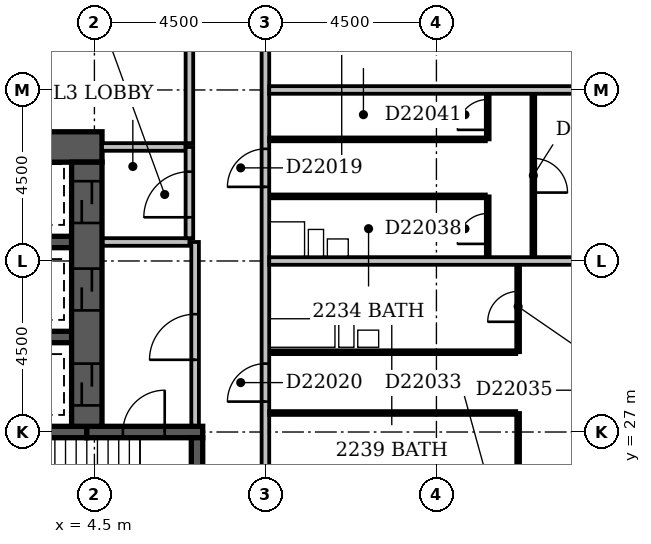
"""IFC4 building model, lengths in metres.
Left out: names, types, materials, properties, quantities, classifications, styles, units other than length and angle.
Written with IfcOpenShell. Run it as: python <this file> out.ifc"""

import sys

from ifc_helpers import new_model, si_unit, direction, frame, frame_2d, origin, place, context, subcontext, project, spatial, rectangle, extrude, element, fill, save


model = new_model("IFC4")
c1 = context("Model", 3, precision=1e-05, world=origin(), true_north=direction((0.0, 1.0)))
c2 = subcontext(c1, "Body", "Model", "MODEL_VIEW")
j1 = project(units=[si_unit("LENGTHUNIT", "METRE"), si_unit("PLANEANGLEUNIT", "RADIAN")], contexts=[c1])
p1 = place(None, origin())
s1 = spatial("IfcSite", under=j1, at=p1, CompositionType="ELEMENT")
p2 = place(p1, origin())
s2 = spatial("IfcBuilding", under=s1, at=p2, CompositionType="ELEMENT")
p3 = place(p2, frame((0.0, 0.0, 90.2)))
s3 = spatial("IfcBuildingStorey", under=s2, at=p3, CompositionType="ELEMENT", Elevation=90.2)
p4 = place(p3, frame((0.1, 34.5, -0.3), z_axis=(0.0, 0.0, 1.0), x_axis=(1.0, 0.0, 0.0)))
e1 = element("IfcWall", 1, at=p4, inside=s3, PredefinedType="SHEAR", context=c2, shape_type="SweptSolid", body=[
    extrude(rectangle(XDim=4.6, YDim=0.8, at=frame_2d((2.3, 0.0))), origin(), (0.0, 0.0, 1.0), 3.6),
])
p5 = place(p3, frame((0.35, 27.0, -0.3), z_axis=(0.0, 0.0, 1.0), x_axis=(1.0, 0.0, 0.0)))
e2 = element("IfcWall", 2, at=p5, inside=s3, PredefinedType="SHEAR", context=c2, shape_type="SweptSolid", body=[
    extrude(rectangle(XDim=3.95, YDim=0.3, at=frame_2d((1.975, 0.0))), origin(), (0.0, 0.0, 1.0), 3.6),
])
for number, where, z_axis, x_axis in (
    (3, (0.9, 29.5, -0.3), (0.0, 0.0, 1.0), (1.0, 0.0, 0.0)),
    (4, (0.9, 32.0, -0.3), (0.0, 0.0, 1.0), (1.0, 0.0, 0.0)),
):
    element("IfcWall", number, at=place(p3, frame(where, z_axis=z_axis, x_axis=x_axis)), inside=s3, PredefinedType="SHEAR", context=c2, shape_type="SweptSolid", body=[
        extrude(rectangle(XDim=3.0, YDim=0.3, at=frame_2d((1.5, 0.0))), origin(), (0.0, 0.0, 1.0), 3.6),
    ])
p6 = place(p3, frame((4.3, 27.0, -0.3), z_axis=(0.0, 0.0, 1.0), x_axis=(1.0, 0.0, 0.0)))
e5 = element("IfcWall", 5, at=p6, inside=s3, PredefinedType="SHEAR", context=c2, shape_type="SweptSolid", body=[
    extrude(rectangle(XDim=3.05, YDim=0.3, at=frame_2d((1.525, 0.0))), origin(), (0.0, 0.0, 1.0), 3.6),
])
p7 = place(p6, frame((0.95, 0.0, 0.3)))
e6 = element("IfcOpeningElement", 6, at=p7, cuts=e5, PredefinedType="OPENING", context=c2, shape_type="SweptSolid", body=[
    extrude(rectangle(XDim=1.1, YDim=2.1, at=frame_2d((0.55, 1.05))), frame((0.0, 0.162, 0.0), z_axis=(0.0, -1.0, 0.0), x_axis=(1.0, 0.0, 0.0)), (0.0, 0.0, 1.0), 0.324),
])
p8 = place(p3, frame((4.3, 27.15, -0.3), z_axis=(0.0, 0.0, 1.0), x_axis=(0.0, 1.0, 0.0)))
e7 = element("IfcWall", 7, at=p8, inside=s3, PredefinedType="SHEAR", context=c2, shape_type="SweptSolid", body=[
    extrude(rectangle(XDim=6.95, YDim=0.8, at=frame_2d((3.475, 0.0))), origin(), (0.0, 0.0, 1.0), 3.6),
])
p9 = place(p8, frame((3.05, 0.0, 0.3)))
e8 = element("IfcOpeningElement", 8, at=p9, cuts=e7, PredefinedType="OPENING", context=c2, shape_type="SweptSolid", body=[
    extrude(rectangle(XDim=1.1, YDim=2.1, at=frame_2d((0.55, 1.05))), frame((0.0, 0.412, 0.0), z_axis=(0.0, -1.0, 0.0), x_axis=(1.0, 0.0, 0.0)), (0.0, 0.0, 1.0), 0.824),
])
p10 = place(p8, frame((0.55, 0.0, 0.3)))
e9 = element("IfcOpeningElement", 9, at=p10, cuts=e7, PredefinedType="OPENING", context=c2, shape_type="SweptSolid", body=[
    extrude(rectangle(XDim=1.1, YDim=2.1, at=frame_2d((0.55, 1.05))), frame((0.0, 0.412, 0.0), z_axis=(0.0, -1.0, 0.0), x_axis=(1.0, 0.0, 0.0)), (0.0, 0.0, 1.0), 0.824),
])
p11 = place(p8, frame((5.35, 0.0, 0.3)))
e10 = element("IfcOpeningElement", 10, at=p11, cuts=e7, PredefinedType="OPENING", context=c2, shape_type="SweptSolid", body=[
    extrude(rectangle(XDim=1.1, YDim=2.1, at=frame_2d((0.55, 1.05))), frame((0.0, 0.412, 0.0), z_axis=(0.0, -1.0, 0.0), x_axis=(1.0, 0.0, 0.0)), (0.0, 0.0, 1.0), 0.824),
])
p12 = place(p3, frame((7.2, 22.65, -0.3), z_axis=(0.0, 0.0, 1.0), x_axis=(0.0, 1.0, 0.0)))
e11 = element("IfcWall", 11, at=p12, inside=s3, PredefinedType="SHEAR", context=c2, shape_type="SweptSolid", body=[
    extrude(rectangle(XDim=4.2, YDim=0.3, at=frame_2d((2.1, 0.0))), origin(), (0.0, 0.0, 1.0), 3.6),
])
p13 = place(p12, frame((0.8, 0.0, 0.3)))
e12 = element("IfcOpeningElement", 12, at=p13, cuts=e11, PredefinedType="OPENING", context=c2, shape_type="SweptSolid", body=[
    extrude(rectangle(XDim=1.1, YDim=2.1, at=frame_2d((0.55, 1.05))), frame((0.0, 0.162, 0.0), z_axis=(0.0, -1.0, 0.0), x_axis=(1.0, 0.0, 0.0)), (0.0, 0.0, 1.0), 0.324),
])
p14 = place(p3, frame((4.72, 32.0, 0.0), z_axis=(0.0, 0.0, 1.0), x_axis=(1.0, 0.0, 0.0)))
e13 = element("IfcWall", 13, at=p14, inside=s3, PredefinedType="PARTITIONING", context=c2, shape_type="SweptSolid", body=[
    extrude(rectangle(XDim=2.28, YDim=0.2, at=frame_2d((1.14, 0.0))), origin(), (0.0, 0.0, 1.0), 3.3),
])
p15 = place(p3, frame((7.0, 32.1, 0.0), z_axis=(0.0, 0.0, 1.0), x_axis=(0.0, 1.0, 0.0)))
e14 = element("IfcWall", 14, at=p15, inside=s3, PredefinedType="PARTITIONING", context=c2, shape_type="SweptSolid", body=[
    extrude(rectangle(XDim=2.4, YDim=0.2, at=frame_2d((1.2, 0.0))), origin(), (0.0, 0.0, 1.0), 3.3),
])
p16 = place(p15, frame((0.55, 0.0, 0.0)))
e15 = element("IfcOpeningElement", 15, at=p16, cuts=e14, PredefinedType="OPENING", context=c2, shape_type="SweptSolid", body=[
    extrude(rectangle(XDim=1.2, YDim=2.1, at=frame_2d((0.6, 1.05))), frame((0.0, 0.112, 0.0), z_axis=(0.0, -1.0, 0.0), x_axis=(1.0, 0.0, 0.0)), (0.0, 0.0, 1.0), 0.224),
])
p17 = place(p3, frame((4.7, 34.5, 0.0), z_axis=(0.0, 0.0, 1.0), x_axis=(1.0, 0.0, 0.0)))
e16 = element("IfcWall", 16, at=p17, inside=s3, PredefinedType="PARTITIONING", context=c2, shape_type="SweptSolid", body=[
    extrude(rectangle(XDim=2.2, YDim=0.2, at=frame_2d((1.1, 0.0))), origin(), (0.0, 0.0, 1.0), 3.3),
])
p18 = place(p3, frame((7.15, 27.17, 0.0), z_axis=(0.0, 0.0, 1.0), x_axis=(0.0, 1.0, 0.0)))
e17 = element("IfcWall", 17, at=p18, inside=s3, PredefinedType="PARTITIONING", context=c2, shape_type="SweptSolid", body=[
    extrude(rectangle(XDim=4.83, YDim=0.2, at=frame_2d((2.415, 0.0))), origin(), (0.0, 0.0, 1.0), 3.3),
])
p19 = place(p18, frame((1.73, 0.0, 0.0)))
e18 = element("IfcOpeningElement", 18, at=p19, cuts=e17, PredefinedType="OPENING", context=c2, shape_type="SweptSolid", body=[
    extrude(rectangle(XDim=1.2, YDim=2.1, at=frame_2d((0.6, 1.05))), frame((0.0, 0.112, 0.0), z_axis=(0.0, -1.0, 0.0), x_axis=(1.0, 0.0, 0.0)), (0.0, 0.0, 1.0), 0.224),
])
p20 = place(p3, frame((9.0, 5.0, 0.0), z_axis=(0.0, 0.0, 1.0), x_axis=(0.0, 1.0, 0.0)))
e19 = element("IfcWall", 19, at=p20, inside=s3, PredefinedType="PARTITIONING", context=c2, shape_type="SweptSolid", body=[
    extrude(rectangle(XDim=44.5, YDim=0.2, at=frame_2d((22.25, 0.0))), origin(), (0.0, 0.0, 1.0), 3.3),
])
p21 = place(p20, frame((28.45, 0.0, 0.0)))
e20 = element("IfcOpeningElement", 20, at=p21, cuts=e19, PredefinedType="OPENING", context=c2, shape_type="SweptSolid", body=[
    extrude(rectangle(XDim=1.0, YDim=2.1, at=frame_2d((0.5, 1.05))), frame((0.0, 0.112, 0.0), z_axis=(0.0, -1.0, 0.0), x_axis=(1.0, 0.0, 0.0)), (0.0, 0.0, 1.0), 0.224),
])
p22 = place(p20, frame((22.8, 0.0, 0.0)))
e21 = element("IfcOpeningElement", 21, at=p22, cuts=e19, PredefinedType="OPENING", context=c2, shape_type="SweptSolid", body=[
    extrude(rectangle(XDim=1.0, YDim=2.1, at=frame_2d((0.5, 1.05))), frame((0.0, 0.112, 0.0), z_axis=(0.0, -1.0, 0.0), x_axis=(1.0, 0.0, 0.0)), (0.0, 0.0, 1.0), 0.224),
])
p23 = place(p20, frame((14.55, 0.0, 0.0)))
e22 = element("IfcOpeningElement", 22, at=p23, cuts=e19, PredefinedType="OPENING", context=c2, shape_type="SweptSolid", body=[
    extrude(rectangle(XDim=1.0, YDim=2.1, at=frame_2d((0.5, 1.05))), frame((0.0, 0.112, 0.0), z_axis=(0.0, -1.0, 0.0), x_axis=(1.0, 0.0, 0.0)), (0.0, 0.0, 1.0), 0.224),
])
p24 = place(p20, frame((9.3, 0.0, 0.0)))
e23 = element("IfcOpeningElement", 23, at=p24, cuts=e19, PredefinedType="OPENING", context=c2, shape_type="SweptSolid", body=[
    extrude(rectangle(XDim=1.0, YDim=2.1, at=frame_2d((0.5, 1.05))), frame((0.0, 0.112, 0.0), z_axis=(0.0, -1.0, 0.0), x_axis=(1.0, 0.0, 0.0)), (0.0, 0.0, 1.0), 0.224),
])
p25 = place(p20, frame((35.0, 0.0, 0.0)))
e24 = element("IfcOpeningElement", 24, at=p25, cuts=e19, PredefinedType="OPENING", context=c2, shape_type="SweptSolid", body=[
    extrude(rectangle(XDim=0.9, YDim=2.1, at=frame_2d((0.45, 1.05))), frame((0.0, 0.112, 0.0), z_axis=(0.0, -1.0, 0.0), x_axis=(1.0, 0.0, 0.0)), (0.0, 0.0, 1.0), 0.224),
])
p26 = place(p20, frame((1.5, 0.0, 0.0)))
e25 = element("IfcOpeningElement", 25, at=p26, cuts=e19, PredefinedType="OPENING", context=c2, shape_type="SweptSolid", body=[
    extrude(rectangle(XDim=0.9, YDim=2.1, at=frame_2d((0.45, 1.05))), frame((0.0, 0.112, 0.0), z_axis=(0.0, -1.0, 0.0), x_axis=(1.0, 0.0, 0.0)), (0.0, 0.0, 1.0), 0.224),
])
p27 = place(p3, frame((15.65, 22.6, 0.0), z_axis=(0.0, 0.0, 1.0), x_axis=(0.0, 1.0, 0.0)))
e26 = element("IfcWall", 26, at=p27, inside=s3, PredefinedType="PARTITIONING", context=c2, shape_type="SweptSolid", body=[
    extrude(rectangle(XDim=4.9, YDim=0.1, at=frame_2d((2.45, 0.0))), origin(), (0.0, 0.0, 1.0), 3.3),
])
p28 = place(p27, frame((1.95, 0.0, 0.0)))
e27 = element("IfcOpeningElement", 27, at=p28, cuts=e26, PredefinedType="OPENING", context=c2, shape_type="SweptSolid", body=[
    extrude(rectangle(XDim=0.9, YDim=2.1, at=frame_2d((0.45, 1.05))), frame((0.0, 0.062, 0.0), z_axis=(0.0, -1.0, 0.0), x_axis=(1.0, 0.0, 0.0)), (0.0, 0.0, 1.0), 0.124),
])
p29 = place(p3, frame((9.1, 27.5, 0.0), z_axis=(0.0, 0.0, 1.0), x_axis=(1.0, 0.0, 0.0)))
e28 = element("IfcWall", 28, at=p29, inside=s3, PredefinedType="PARTITIONING", context=c2, shape_type="SweptSolid", body=[
    extrude(rectangle(XDim=6.5, YDim=0.1, at=frame_2d((3.25, 0.0))), origin(), (0.0, 0.0, 1.0), 2.7),
])
p30 = place(p3, frame((9.1, 29.1, 0.0), z_axis=(0.0, 0.0, 1.0), x_axis=(1.0, 0.0, 0.0)))
e29 = element("IfcWall", 29, at=p30, inside=s3, PredefinedType="PLUMBINGWALL", context=c2, shape_type="SweptSolid", body=[
    extrude(rectangle(XDim=6.5, YDim=0.1, at=frame_2d((3.25, 0.0))), origin(), (0.0, 0.0, 1.0), 3.3),
])
p31 = place(p3, frame((15.65, 29.1, 0.0), z_axis=(0.0, 0.0, 1.0), x_axis=(0.0, 1.0, 0.0)))
e30 = element("IfcWall", 30, at=p31, inside=s3, PredefinedType="PARTITIONING", context=c2, shape_type="SweptSolid", body=[
    extrude(rectangle(XDim=2.3, YDim=0.1, at=frame_2d((1.15, 0.0))), origin(), (0.0, 0.0, 1.0), 3.3),
])
p32 = place(p31, frame((0.8, 0.0, 0.0)))
e31 = element("IfcOpeningElement", 31, at=p32, cuts=e30, PredefinedType="OPENING", context=c2, shape_type="SweptSolid", body=[
    extrude(rectangle(XDim=0.8, YDim=2.1, at=frame_2d((0.4, 1.05))), frame((0.0, 0.062, 0.0), z_axis=(0.0, -1.0, 0.0), x_axis=(1.0, 0.0, 0.0)), (0.0, 0.0, 1.0), 0.124),
])
p33 = place(p3, frame((9.1, 31.5, 0.0), z_axis=(0.0, 0.0, 1.0), x_axis=(1.0, 0.0, 0.0)))
e32 = element("IfcWall", 32, at=p33, inside=s3, PredefinedType="PARTITIONING", context=c2, shape_type="SweptSolid", body=[
    extrude(rectangle(XDim=12.8, YDim=0.2, at=frame_2d((6.4, 0.0))), origin(), (0.0, 0.0, 1.0), 3.3),
])
p34 = place(p3, frame((14.85, 31.6, 0.0), z_axis=(0.0, 0.0, 1.0), x_axis=(0.0, 1.0, 0.0)))
e33 = element("IfcWall", 33, at=p34, inside=s3, PredefinedType="PARTITIONING", context=c2, shape_type="SweptSolid", body=[
    extrude(rectangle(XDim=1.6, YDim=0.1, at=frame_2d((0.8, 0.0))), origin(), (0.0, 0.0, 1.0), 3.3),
])
p35 = place(p34, frame((0.35, 0.0, 0.0)))
e34 = element("IfcOpeningElement", 34, at=p35, cuts=e33, PredefinedType="OPENING", context=c2, shape_type="SweptSolid", body=[
    extrude(rectangle(XDim=0.8, YDim=2.1, at=frame_2d((0.4, 1.05))), frame((0.0, 0.062, 0.0), z_axis=(0.0, -1.0, 0.0), x_axis=(1.0, 0.0, 0.0)), (0.0, 0.0, 1.0), 0.124),
])
p36 = place(p3, frame((16.05, 31.6, 0.0), z_axis=(0.0, 0.0, 1.0), x_axis=(0.0, 1.0, 0.0)))
e35 = element("IfcWall", 35, at=p36, inside=s3, PredefinedType="PARTITIONING", context=c2, shape_type="SweptSolid", body=[
    extrude(rectangle(XDim=4.3, YDim=0.1, at=frame_2d((2.15, 0.0))), origin(), (0.0, 0.0, 1.0), 3.3),
])
p37 = place(p36, frame((1.7, 0.0, 0.0)))
e36 = element("IfcOpeningElement", 36, at=p37, cuts=e35, PredefinedType="OPENING", context=c2, shape_type="SweptSolid", body=[
    extrude(rectangle(XDim=0.9, YDim=2.1, at=frame_2d((0.45, 1.05))), frame((0.0, 0.062, 0.0), z_axis=(0.0, -1.0, 0.0), x_axis=(1.0, 0.0, 0.0)), (0.0, 0.0, 1.0), 0.124),
])
p38 = place(p3, frame((9.1, 33.2, 0.0), z_axis=(0.0, 0.0, 1.0), x_axis=(1.0, 0.0, 0.0)))
e37 = element("IfcWall", 37, at=p38, inside=s3, PredefinedType="PLUMBINGWALL", context=c2, shape_type="SweptSolid", body=[
    extrude(rectangle(XDim=5.7, YDim=0.1, at=frame_2d((2.85, 0.0))), origin(), (0.0, 0.0, 1.0), 3.3),
])
p39 = place(p3, frame((7.0, 34.6, 0.0), z_axis=(0.0, 0.0, 1.0), x_axis=(0.0, 1.0, 0.0)))
e38 = element("IfcWall", 38, at=p39, inside=s3, PredefinedType="PARTITIONING", context=c2, shape_type="SweptSolid", body=[
    extrude(rectangle(XDim=14.8, YDim=0.2, at=frame_2d((7.4, 0.0))), origin(), (0.0, 0.0, 1.0), 3.3),
])
p40 = place(p39, frame((6.95, 0.0, 0.0)))
e39 = element("IfcOpeningElement", 39, at=p40, cuts=e38, PredefinedType="OPENING", context=c2, shape_type="SweptSolid", body=[
    extrude(rectangle(XDim=0.9, YDim=2.1, at=frame_2d((0.45, 1.05))), frame((0.0, 0.112, 0.0), z_axis=(0.0, -1.0, 0.0), x_axis=(1.0, 0.0, 0.0)), (0.0, 0.0, 1.0), 0.224),
])
p41 = place(p3, frame((9.1, 34.7, 0.0), z_axis=(0.0, 0.0, 1.0), x_axis=(1.0, 0.0, 0.0)))
e40 = element("IfcWall", 40, at=p41, inside=s3, PredefinedType="PARTITIONING", context=c2, shape_type="SweptSolid", body=[
    extrude(rectangle(XDim=5.7, YDim=0.1, at=frame_2d((2.85, 0.0))), origin(), (0.0, 0.0, 1.0), 3.3),
])
p42 = place(p3, frame((14.85, 34.7, 0.0), z_axis=(0.0, 0.0, 1.0), x_axis=(0.0, 1.0, 0.0)))
e41 = element("IfcWall", 41, at=p42, inside=s3, PredefinedType="PARTITIONING", context=c2, shape_type="SweptSolid", body=[
    extrude(rectangle(XDim=1.2, YDim=0.1, at=frame_2d((0.6, 0.0))), origin(), (0.0, 0.0, 1.0), 3.3),
])
p43 = place(p42, frame((0.25, 0.0, 0.0)))
e42 = element("IfcOpeningElement", 42, at=p43, cuts=e41, PredefinedType="OPENING", context=c2, shape_type="SweptSolid", body=[
    extrude(rectangle(XDim=0.8, YDim=2.1, at=frame_2d((0.4, 1.05))), frame((0.0, 0.062, 0.0), z_axis=(0.0, -1.0, 0.0), x_axis=(1.0, 0.0, 0.0)), (0.0, 0.0, 1.0), 0.124),
])
p44 = place(p3, frame((9.1, 36.0, 0.0), z_axis=(0.0, 0.0, 1.0), x_axis=(1.0, 0.0, 0.0)))
e43 = element("IfcWall", 43, at=p44, inside=s3, PredefinedType="PARTITIONING", context=c2, shape_type="SweptSolid", body=[
    extrude(rectangle(XDim=12.8, YDim=0.2, at=frame_2d((6.4, 0.0))), origin(), (0.0, 0.0, 1.0), 2.4),
])
p45 = place(p19, origin())
e44 = element("IfcDoor", 44, at=p45, inside=s3, OperationType="SINGLE_SWING_LEFT", PredefinedType="DOOR", context=c2, shape_type="SweptSolid", body=[
    extrude(rectangle(XDim=1.2, YDim=2.1, at=frame_2d((0.6, 1.05))), frame((0.0, 0.025, 0.0), z_axis=(0.0, -1.0, 0.0), x_axis=(1.0, 0.0, 0.0)), (0.0, 0.0, 1.0), 0.05),
])
fill(e18, e44)
p46 = place(p9, origin())
e45 = element("IfcDoor", 45, at=p46, inside=s3, OperationType="SLIDING_TO_LEFT", PredefinedType="DOOR", context=c2, shape_type="SweptSolid", body=[
    extrude(rectangle(XDim=1.1, YDim=2.1, at=frame_2d((0.55, 1.05))), frame((0.0, 0.025, 0.0), z_axis=(0.0, -1.0, 0.0), x_axis=(1.0, 0.0, 0.0)), (0.0, 0.0, 1.0), 0.05),
])
fill(e8, e45)
p47 = place(p10, origin())
e46 = element("IfcDoor", 46, at=p47, inside=s3, OperationType="SLIDING_TO_LEFT", PredefinedType="DOOR", context=c2, shape_type="SweptSolid", body=[
    extrude(rectangle(XDim=1.1, YDim=2.1, at=frame_2d((0.55, 1.05))), frame((0.0, 0.025, 0.0), z_axis=(0.0, -1.0, 0.0), x_axis=(1.0, 0.0, 0.0)), (0.0, 0.0, 1.0), 0.05),
])
fill(e9, e46)
p48 = place(p16, origin())
e47 = element("IfcDoor", 47, at=p48, inside=s3, OperationType="SINGLE_SWING_LEFT", PredefinedType="DOOR", context=c2, shape_type="SweptSolid", body=[
    extrude(rectangle(XDim=1.2, YDim=2.1, at=frame_2d((0.6, 1.05))), frame((0.0, 0.025, 0.0), z_axis=(0.0, -1.0, 0.0), x_axis=(1.0, 0.0, 0.0)), (0.0, 0.0, 1.0), 0.05),
])
fill(e15, e47)
p49 = place(p11, origin())
e48 = element("IfcDoor", 48, at=p49, inside=s3, OperationType="SLIDING_TO_LEFT", PredefinedType="DOOR", context=c2, shape_type="SweptSolid", body=[
    extrude(rectangle(XDim=1.1, YDim=2.1, at=frame_2d((0.55, 1.05))), frame((0.0, 0.025, 0.0), z_axis=(0.0, -1.0, 0.0), x_axis=(1.0, 0.0, 0.0)), (0.0, 0.0, 1.0), 0.05),
])
fill(e10, e48)
p50 = place(p7, frame((1.1, 0.0, 0.0), z_axis=(0.0, 0.0, 1.0), x_axis=(-1.0, 0.0, 0.0)))
e49 = element("IfcDoor", 49, at=p50, inside=s3, OperationType="SINGLE_SWING_LEFT", PredefinedType="DOOR", context=c2, shape_type="SweptSolid", body=[
    extrude(rectangle(XDim=1.1, YDim=2.1, at=frame_2d((0.55, 1.05))), frame((0.0, 0.025, 0.0), z_axis=(0.0, -1.0, 0.0), x_axis=(1.0, 0.0, 0.0)), (0.0, 0.0, 1.0), 0.05),
])
fill(e6, e49)
p51 = place(p21, origin())
e50 = element("IfcDoor", 50, at=p51, inside=s3, OperationType="SINGLE_SWING_LEFT", PredefinedType="DOOR", context=c2, shape_type="SweptSolid", body=[
    extrude(rectangle(XDim=1.0, YDim=2.1, at=frame_2d((0.5, 1.05))), frame((0.0, 0.025, 0.0), z_axis=(0.0, -1.0, 0.0), x_axis=(1.0, 0.0, 0.0)), (0.0, 0.0, 1.0), 0.05),
])
fill(e20, e50)
p52 = place(p22, origin())
e51 = element("IfcDoor", 51, at=p52, inside=s3, OperationType="SINGLE_SWING_LEFT", PredefinedType="DOOR", context=c2, shape_type="SweptSolid", body=[
    extrude(rectangle(XDim=1.0, YDim=2.1, at=frame_2d((0.5, 1.05))), frame((0.0, 0.025, 0.0), z_axis=(0.0, -1.0, 0.0), x_axis=(1.0, 0.0, 0.0)), (0.0, 0.0, 1.0), 0.05),
])
fill(e21, e51)
p53 = place(p32, origin())
e52 = element("IfcDoor", 52, at=p53, inside=s3, OperationType="SINGLE_SWING_LEFT", PredefinedType="DOOR", context=c2, shape_type="SweptSolid", body=[
    extrude(rectangle(XDim=0.8, YDim=2.1, at=frame_2d((0.4, 1.05))), frame((0.0, 0.025, 0.0), z_axis=(0.0, -1.0, 0.0), x_axis=(1.0, 0.0, 0.0)), (0.0, 0.0, 1.0), 0.05),
])
fill(e31, e52)
p54 = place(p35, origin())
e53 = element("IfcDoor", 53, at=p54, inside=s3, OperationType="SINGLE_SWING_LEFT", PredefinedType="DOOR", context=c2, shape_type="SweptSolid", body=[
    extrude(rectangle(XDim=0.8, YDim=2.1, at=frame_2d((0.4, 1.05))), frame((0.0, 0.025, 0.0), z_axis=(0.0, -1.0, 0.0), x_axis=(1.0, 0.0, 0.0)), (0.0, 0.0, 1.0), 0.05),
])
fill(e34, e53)
p55 = place(p37, frame((0.9, 0.0, 0.0), z_axis=(0.0, 0.0, 1.0), x_axis=(-1.0, 0.0, 0.0)))
e54 = element("IfcDoor", 54, at=p55, inside=s3, OperationType="SINGLE_SWING_RIGHT", PredefinedType="DOOR", context=c2, shape_type="SweptSolid", body=[
    extrude(rectangle(XDim=0.9, YDim=2.1, at=frame_2d((0.45, 1.05))), frame((0.0, 0.025, 0.0), z_axis=(0.0, -1.0, 0.0), x_axis=(1.0, 0.0, 0.0)), (0.0, 0.0, 1.0), 0.05),
])
fill(e36, e54)
p56 = place(p43, origin())
e55 = element("IfcDoor", 55, at=p56, inside=s3, OperationType="SINGLE_SWING_LEFT", PredefinedType="DOOR", context=c2, shape_type="SweptSolid", body=[
    extrude(rectangle(XDim=0.8, YDim=2.1, at=frame_2d((0.4, 1.05))), frame((0.0, 0.025, 0.0), z_axis=(0.0, -1.0, 0.0), x_axis=(1.0, 0.0, 0.0)), (0.0, 0.0, 1.0), 0.05),
])
fill(e42, e55)
save(model, sys.argv[1])
